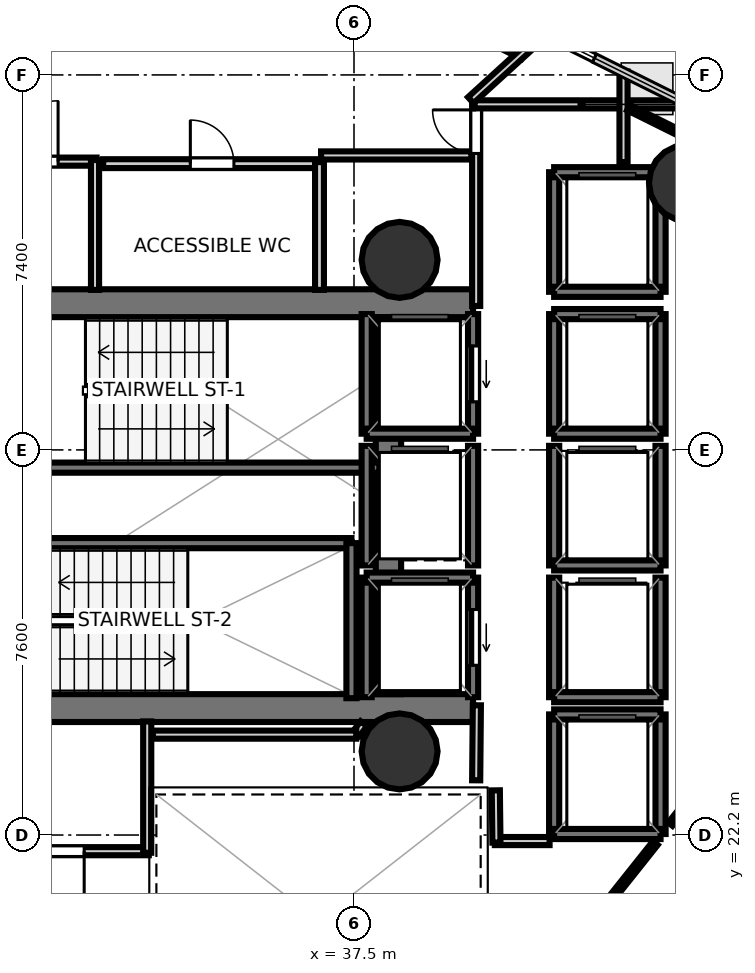
"""IFC4 building model, lengths in metres.
Left out: names, types, materials, properties, quantities, classifications, styles, units other than length and angle.
Written with IfcOpenShell. Run it as: python <this file> out.ifc"""

import sys

from ifc_helpers import new_model, si_unit, direction, frame, frame_2d, origin, origin_2d, place, context, subcontext, project, spatial, rectangle, hollow_circle, extrude, element, fill, save


model = new_model("IFC4")
c1 = context("Model", 3, precision=1e-05, world=origin(), true_north=direction((0.0, 1.0)))
c2 = subcontext(c1, "Body", "Model", "MODEL_VIEW")
j1 = project(units=[si_unit("LENGTHUNIT", "METRE"), si_unit("PLANEANGLEUNIT", "RADIAN")], contexts=[c1])
p1 = place(None, origin())
s1 = spatial("IfcSite", under=j1, at=p1, CompositionType="ELEMENT")
p2 = place(p1, origin())
s2 = spatial("IfcBuilding", under=s1, at=p2, CompositionType="ELEMENT")
p3 = place(p2, frame((0.0, 0.0, 134.8)))
s3 = spatial("IfcBuildingStorey", under=s2, at=p3, CompositionType="ELEMENT", Elevation=134.8)
p4 = place(p3, frame((29.23, 32.695, 0.0), z_axis=(0.0, 0.0, 1.0), x_axis=(1.0, 0.0, 0.0)))
e1 = element("IfcWall", 1, at=p4, inside=s3, PredefinedType="SHEAR", context=c2, shape_type="SweptSolid", body=[
    extrude(rectangle(XDim=10.62, YDim=0.55, at=frame_2d((5.31, 0.0))), origin(), (0.0, 0.0, 1.0), 3.4),
])
p5 = place(p4, frame((0.995, 0.0, 0.0)))
e2 = element("IfcOpeningElement", 2, at=p5, cuts=e1, PredefinedType="OPENING", context=c2, shape_type="SweptSolid", body=[
    extrude(rectangle(XDim=1.25, YDim=2.15, at=frame_2d((0.625, 1.075))), frame((0.0, 0.285, 0.0), z_axis=(0.0, -1.0, 0.0), x_axis=(1.0, 0.0, 0.0)), (0.0, 0.0, 1.0), 0.57),
])
p6 = place(p3, frame((29.23, 24.705, 0.0), z_axis=(0.0, 0.0, 1.0), x_axis=(1.0, 0.0, 0.0)))
e3 = element("IfcWall", 3, at=p6, inside=s3, PredefinedType="SHEAR", context=c2, shape_type="SweptSolid", body=[
    extrude(rectangle(XDim=10.62, YDim=0.55, at=frame_2d((5.31, 0.0))), origin(), (0.0, 0.0, 1.0), 3.4),
])
p7 = place(p6, frame((0.795, 0.0, 0.0)))
e4 = element("IfcOpeningElement", 4, at=p7, cuts=e3, PredefinedType="OPENING", context=c2, shape_type="SweptSolid", body=[
    extrude(rectangle(XDim=1.25, YDim=2.15, at=frame_2d((0.625, 1.075))), frame((0.0, 0.285, 0.0), z_axis=(0.0, -1.0, 0.0), x_axis=(1.0, 0.0, 0.0)), (0.0, 0.0, 1.0), 0.57),
])
p8 = place(p3, frame((38.18, 24.98, 0.0), z_axis=(0.0, 0.0, 1.0), x_axis=(0.0, 1.0, 0.0)))
e5 = element("IfcWall", 5, at=p8, inside=s3, PredefinedType="SHEAR", context=c2, shape_type="SweptSolid", body=[
    extrude(rectangle(XDim=7.44, YDim=0.5, at=frame_2d((3.72, 0.0))), origin(), (0.0, 0.0, 1.0), 3.4),
])
for number, where, z_axis, x_axis in (
    (6, (38.4, 33.55, 0.0), (0.0, 0.0, 1.0), (1.0, 0.0, 0.0)),
    (7, (38.4, 23.85, 0.0), (0.0, 0.0, 1.0), (1.0, 0.0, 0.0)),
    (8, (44.071, 35.07, 0.0), (0.0, 0.0, 1.0), (1.0, 0.0, 0.0)),
):
    element("IfcColumn", number, at=place(p3, frame(where, z_axis=z_axis, x_axis=x_axis)), inside=s3, PredefinedType="COLUMN", context=c2, shape_type="SweptSolid", body=[
        extrude(hollow_circle(Radius=0.75, WallThickness=0.036, at=origin_2d()), origin(), (0.0, 0.0, 1.0), 3.7),
    ])
p9 = place(p3, frame((29.7, 29.45, 0.0), z_axis=(0.0, 0.0, 1.0), x_axis=(1.0, 0.0, 0.0)))
e9 = element("IfcWall", 9, at=p9, inside=s3, PredefinedType="SOLIDWALL", context=c2, shape_type="SweptSolid", body=[
    extrude(rectangle(XDim=8.3, YDim=0.2, at=frame_2d((4.15, 0.0))), origin(), (0.0, 0.0, 1.0), 3.4),
])
p10 = place(p3, frame((29.7, 27.96, 0.0), z_axis=(0.0, 0.0, 1.0), x_axis=(1.0, 0.0, 0.0)))
e10 = element("IfcWall", 10, at=p10, inside=s3, PredefinedType="SOLIDWALL", context=c2, shape_type="SweptSolid", body=[
    extrude(rectangle(XDim=7.75, YDim=0.2, at=frame_2d((3.875, 0.0))), origin(), (0.0, 0.0, 1.0), 3.4),
])
p11 = place(p3, frame((37.45, 24.9, 0.0), z_axis=(0.0, 0.0, 1.0), x_axis=(0.0, 1.0, 0.0)))
e11 = element("IfcWall", 11, at=p11, inside=s3, PredefinedType="SOLIDWALL", context=c2, shape_type="SweptSolid", body=[
    extrude(rectangle(XDim=3.06, YDim=0.2, at=frame_2d((1.53, 0.0))), origin(), (0.0, 0.0, 1.0), 3.4),
])
p12 = place(p3, frame((39.85, 30.12, 0.0), z_axis=(0.0, 0.0, 1.0), x_axis=(0.0, 1.0, 0.0)))
e12 = element("IfcWall", 12, at=p12, inside=s3, PredefinedType="SOLIDWALL", context=c2, shape_type="SweptSolid", body=[
    extrude(rectangle(XDim=2.36, YDim=0.2, at=frame_2d((1.18, 0.0))), origin(), (0.0, 0.0, 1.0), 3.4),
])
p13 = place(p12, frame((0.63, 0.0, 0.0)))
e13 = element("IfcOpeningElement", 13, at=p13, cuts=e12, PredefinedType="OPENING", context=c2, shape_type="SweptSolid", body=[
    extrude(rectangle(XDim=1.1, YDim=2.15, at=frame_2d((0.55, 1.075))), frame((0.0, 0.11, 0.0), z_axis=(0.0, -1.0, 0.0), x_axis=(1.0, 0.0, 0.0)), (0.0, 0.0, 1.0), 0.22),
])
p14 = place(p3, frame((37.75, 30.12, 0.0), z_axis=(0.0, 0.0, 1.0), x_axis=(0.0, 1.0, 0.0)))
e14 = element("IfcWall", 14, at=p14, inside=s3, PredefinedType="SOLIDWALL", context=c2, shape_type="SweptSolid", body=[
    extrude(rectangle(XDim=2.36, YDim=0.2, at=frame_2d((1.18, 0.0))), origin(), (0.0, 0.0, 1.0), 3.4),
])
p15 = place(p3, frame((37.75, 30.12, 0.0), z_axis=(0.0, 0.0, 1.0), x_axis=(1.0, 0.0, 0.0)))
e15 = element("IfcWall", 15, at=p15, inside=s3, PredefinedType="SOLIDWALL", context=c2, shape_type="SweptSolid", body=[
    extrude(rectangle(XDim=2.1, YDim=0.2, at=frame_2d((1.05, 0.0))), origin(), (0.0, 0.0, 1.0), 3.4),
])
p16 = place(p3, frame((39.85, 24.92, 0.0), z_axis=(0.0, 0.0, 1.0), x_axis=(0.0, 1.0, 0.0)))
e16 = element("IfcWall", 16, at=p16, inside=s3, PredefinedType="SOLIDWALL", context=c2, shape_type="SweptSolid", body=[
    extrude(rectangle(XDim=2.36, YDim=0.2, at=frame_2d((1.18, 0.0))), origin(), (0.0, 0.0, 1.0), 3.4),
])
p17 = place(p16, frame((0.63, 0.0, 0.0)))
e17 = element("IfcOpeningElement", 17, at=p17, cuts=e16, PredefinedType="OPENING", context=c2, shape_type="SweptSolid", body=[
    extrude(rectangle(XDim=1.1, YDim=2.15, at=frame_2d((0.55, 1.075))), frame((0.0, 0.11, 0.0), z_axis=(0.0, -1.0, 0.0), x_axis=(1.0, 0.0, 0.0)), (0.0, 0.0, 1.0), 0.22),
])
p18 = place(p3, frame((37.75, 24.92, 0.0), z_axis=(0.0, 0.0, 1.0), x_axis=(0.0, 1.0, 0.0)))
e18 = element("IfcWall", 18, at=p18, inside=s3, PredefinedType="SOLIDWALL", context=c2, shape_type="SweptSolid", body=[
    extrude(rectangle(XDim=2.36, YDim=0.2, at=frame_2d((1.18, 0.0))), origin(), (0.0, 0.0, 1.0), 3.4),
])
p19 = place(p3, frame((37.75, 27.28, 0.0), z_axis=(0.0, 0.0, 1.0), x_axis=(1.0, 0.0, 0.0)))
e19 = element("IfcWall", 19, at=p19, inside=s3, PredefinedType="SOLIDWALL", context=c2, shape_type="SweptSolid", body=[
    extrude(rectangle(XDim=2.1, YDim=0.2, at=frame_2d((1.05, 0.0))), origin(), (0.0, 0.0, 1.0), 3.4),
])
for number, where, z_axis, x_axis in (
    (20, (43.55, 30.12, 0.0), (0.0, 0.0, 1.0), (0.0, 1.0, 0.0)),
    (21, (41.45, 30.12, 0.0), (0.0, 0.0, 1.0), (0.0, 1.0, 0.0)),
):
    element("IfcWall", number, at=place(p3, frame(where, z_axis=z_axis, x_axis=x_axis)), inside=s3, PredefinedType="SOLIDWALL", context=c2, shape_type="SweptSolid", body=[
        extrude(rectangle(XDim=2.36, YDim=0.2, at=frame_2d((1.18, 0.0))), origin(), (0.0, 0.0, 1.0), 3.4),
    ])
for number, where, z_axis, x_axis in (
    (22, (41.45, 32.48, 0.0), (0.0, 0.0, 1.0), (1.0, 0.0, 0.0)),
    (23, (41.45, 30.12, 0.0), (0.0, 0.0, 1.0), (1.0, 0.0, 0.0)),
):
    element("IfcWall", number, at=place(p3, frame(where, z_axis=z_axis, x_axis=x_axis)), inside=s3, PredefinedType="SOLIDWALL", context=c2, shape_type="SweptSolid", body=[
        extrude(rectangle(XDim=2.1, YDim=0.2, at=frame_2d((1.05, 0.0))), origin(), (0.0, 0.0, 1.0), 3.4),
    ])
for number, where, z_axis, x_axis in (
    (24, (43.55, 27.52, 0.0), (0.0, 0.0, 1.0), (0.0, 1.0, 0.0)),
    (25, (41.45, 27.52, 0.0), (0.0, 0.0, 1.0), (0.0, 1.0, 0.0)),
):
    element("IfcWall", number, at=place(p3, frame(where, z_axis=z_axis, x_axis=x_axis)), inside=s3, PredefinedType="SOLIDWALL", context=c2, shape_type="SweptSolid", body=[
        extrude(rectangle(XDim=2.36, YDim=0.2, at=frame_2d((1.18, 0.0))), origin(), (0.0, 0.0, 1.0), 3.4),
    ])
p20 = place(p3, frame((41.45, 27.52, 0.0), z_axis=(0.0, 0.0, 1.0), x_axis=(1.0, 0.0, 0.0)))
e26 = element("IfcWall", 26, at=p20, inside=s3, PredefinedType="SOLIDWALL", context=c2, shape_type="SweptSolid", body=[
    extrude(rectangle(XDim=2.1, YDim=0.2, at=frame_2d((1.05, 0.0))), origin(), (0.0, 0.0, 1.0), 3.4),
])
for number, where, z_axis, x_axis in (
    (27, (43.55, 24.92, 0.0), (0.0, 0.0, 1.0), (0.0, 1.0, 0.0)),
    (28, (41.45, 24.92, 0.0), (0.0, 0.0, 1.0), (0.0, 1.0, 0.0)),
):
    element("IfcWall", number, at=place(p3, frame(where, z_axis=z_axis, x_axis=x_axis)), inside=s3, PredefinedType="SOLIDWALL", context=c2, shape_type="SweptSolid", body=[
        extrude(rectangle(XDim=2.36, YDim=0.2, at=frame_2d((1.18, 0.0))), origin(), (0.0, 0.0, 1.0), 3.4),
    ])
p21 = place(p3, frame((41.45, 24.92, 0.0), z_axis=(0.0, 0.0, 1.0), x_axis=(1.0, 0.0, 0.0)))
e29 = element("IfcWall", 29, at=p21, inside=s3, PredefinedType="SOLIDWALL", context=c2, shape_type="SweptSolid", body=[
    extrude(rectangle(XDim=2.1, YDim=0.2, at=frame_2d((1.05, 0.0))), origin(), (0.0, 0.0, 1.0), 3.4),
])
for number, where, z_axis, x_axis in (
    (30, (39.85, 27.52, 0.0), (0.0, 0.0, 1.0), (0.0, 1.0, 0.0)),
    (31, (37.75, 27.52, 0.0), (0.0, 0.0, 1.0), (0.0, 1.0, 0.0)),
):
    element("IfcWall", number, at=place(p3, frame(where, z_axis=z_axis, x_axis=x_axis)), inside=s3, PredefinedType="SOLIDWALL", context=c2, shape_type="SweptSolid", body=[
        extrude(rectangle(XDim=2.36, YDim=0.2, at=frame_2d((1.18, 0.0))), origin(), (0.0, 0.0, 1.0), 3.4),
    ])
for number, where, z_axis, x_axis in (
    (32, (43.55, 22.22, 0.0), (0.0, 0.0, 1.0), (0.0, 1.0, 0.0)),
    (33, (41.45, 22.22, 0.0), (0.0, 0.0, 1.0), (0.0, 1.0, 0.0)),
):
    element("IfcWall", number, at=place(p3, frame(where, z_axis=z_axis, x_axis=x_axis)), inside=s3, PredefinedType="SOLIDWALL", context=c2, shape_type="SweptSolid", body=[
        extrude(rectangle(XDim=2.36, YDim=0.2, at=frame_2d((1.18, 0.0))), origin(), (0.0, 0.0, 1.0), 3.4),
    ])
for number, where, z_axis, x_axis in (
    (34, (41.45, 24.58, 0.0), (0.0, 0.0, 1.0), (1.0, 0.0, 0.0)),
    (35, (41.45, 22.22, 0.0), (0.0, 0.0, 1.0), (1.0, 0.0, 0.0)),
):
    element("IfcWall", number, at=place(p3, frame(where, z_axis=z_axis, x_axis=x_axis)), inside=s3, PredefinedType="SOLIDWALL", context=c2, shape_type="SweptSolid", body=[
        extrude(rectangle(XDim=2.1, YDim=0.2, at=frame_2d((1.05, 0.0))), origin(), (0.0, 0.0, 1.0), 3.4),
    ])
for number, where, z_axis, x_axis in (
    (36, (43.55, 32.92, 0.0), (0.0, 0.0, 1.0), (0.0, 1.0, 0.0)),
    (37, (41.45, 32.92, 0.0), (0.0, 0.0, 1.0), (0.0, 1.0, 0.0)),
):
    element("IfcWall", number, at=place(p3, frame(where, z_axis=z_axis, x_axis=x_axis)), inside=s3, PredefinedType="SOLIDWALL", context=c2, shape_type="SweptSolid", body=[
        extrude(rectangle(XDim=2.36, YDim=0.2, at=frame_2d((1.18, 0.0))), origin(), (0.0, 0.0, 1.0), 3.4),
    ])
for number, where, z_axis, x_axis in (
    (38, (41.45, 35.28, 0.0), (0.0, 0.0, 1.0), (1.0, 0.0, 0.0)),
    (39, (41.45, 32.92, 0.0), (0.0, 0.0, 1.0), (1.0, 0.0, 0.0)),
):
    element("IfcWall", number, at=place(p3, frame(where, z_axis=z_axis, x_axis=x_axis)), inside=s3, PredefinedType="SOLIDWALL", context=c2, shape_type="SweptSolid", body=[
        extrude(rectangle(XDim=2.1, YDim=0.2, at=frame_2d((1.05, 0.0))), origin(), (0.0, 0.0, 1.0), 3.4),
    ])
p22 = place(p3, frame((29.7, 35.489, 0.0), z_axis=(0.0, 0.0, 1.0), x_axis=(1.0, 0.0, 0.0)))
e40 = element("IfcWall", 40, at=p22, inside=s3, PredefinedType="PARTITIONING", context=c2, shape_type="SweptSolid", body=[
    extrude(rectangle(XDim=2.72, YDim=0.16, at=frame_2d((1.36, 0.0))), origin(), (0.0, 0.0, 1.0), 2.72),
])
p23 = place(p22, frame((0.76, 0.0, 0.0)))
e41 = element("IfcOpeningElement", 41, at=p23, cuts=e40, PredefinedType="OPENING", context=c2, shape_type="SweptSolid", body=[
    extrude(rectangle(XDim=1.2, YDim=2.15, at=frame_2d((0.6, 1.075))), frame((0.0, 0.09, 0.0), z_axis=(0.0, -1.0, 0.0), x_axis=(1.0, 0.0, 0.0)), (0.0, 0.0, 1.0), 0.18),
])
p24 = place(p3, frame((32.389, 35.52, 0.0), z_axis=(0.0, 0.0, 1.0), x_axis=(0.0, -1.0, 0.0)))
e42 = element("IfcWall", 42, at=p24, inside=s3, PredefinedType="PARTITIONING", context=c2, shape_type="SweptSolid", body=[
    extrude(rectangle(XDim=2.562, YDim=0.16, at=frame_2d((1.281, 0.0))), origin(), (0.0, 0.0, 1.0), 2.72),
])
p25 = place(p3, frame((33.45, 21.881, 0.0), z_axis=(0.0, 0.0, 1.0), x_axis=(-1.0, 0.0, 0.0)))
e43 = element("IfcWall", 43, at=p25, inside=s3, PredefinedType="PARTITIONING", context=c2, shape_type="SweptSolid", body=[
    extrude(rectangle(XDim=3.75, YDim=0.16, at=frame_2d((1.875, 0.0))), origin(), (0.0, 0.0, 1.0), 2.72),
])
p26 = place(p25, frame((1.275, 0.0, 0.0)))
e44 = element("IfcOpeningElement", 44, at=p26, cuts=e43, PredefinedType="OPENING", context=c2, shape_type="SweptSolid", body=[
    extrude(rectangle(XDim=1.2, YDim=2.15, at=frame_2d((0.6, 1.075))), frame((0.0, 0.09, 0.0), z_axis=(0.0, -1.0, 0.0), x_axis=(1.0, 0.0, 0.0)), (0.0, 0.0, 1.0), 0.18),
])
p27 = place(p25, frame((2.66, 0.0, 0.0)))
e45 = element("IfcOpeningElement", 45, at=p27, cuts=e43, PredefinedType="OPENING", context=c2, shape_type="SweptSolid", body=[
    extrude(rectangle(XDim=0.86, YDim=2.05, at=frame_2d((0.43, 1.025))), frame((0.0, 0.09, 0.0), z_axis=(0.0, -1.0, 0.0), x_axis=(1.0, 0.0, 0.0)), (0.0, 0.0, 1.0), 0.18),
])
p28 = place(p3, frame((33.419, 24.442, 0.0), z_axis=(0.0, 0.0, 1.0), x_axis=(0.0, -1.0, 0.0)))
e46 = element("IfcWall", 46, at=p28, inside=s3, PredefinedType="PARTITIONING", context=c2, shape_type="SweptSolid", body=[
    extrude(rectangle(XDim=2.592, YDim=0.16, at=frame_2d((1.296, 0.0))), origin(), (0.0, 0.0, 1.0), 2.72),
])
p29 = place(p3, frame((39.911, 32.64, 0.0), z_axis=(0.0, 0.0, 1.0), x_axis=(0.0, 1.0, 0.0)))
e47 = element("IfcWall", 47, at=p29, inside=s3, PredefinedType="PARTITIONING", context=c2, shape_type="SweptSolid", body=[
    extrude(rectangle(XDim=4.01, YDim=0.16, at=frame_2d((2.005, 0.0))), origin(), (0.0, 0.0, 1.0), 2.72),
])
p30 = place(p29, frame((3.01, 0.0, 0.0)))
e48 = element("IfcOpeningElement", 48, at=p30, cuts=e47, PredefinedType="OPENING", context=c2, shape_type="SweptSolid", body=[
    extrude(rectangle(XDim=0.86, YDim=2.05, at=frame_2d((0.43, 1.025))), frame((0.0, 0.09, 0.0), z_axis=(0.0, -1.0, 0.0), x_axis=(1.0, 0.0, 0.0)), (0.0, 0.0, 1.0), 0.18),
])
p31 = place(p3, frame((39.88, 36.619, 0.0), z_axis=(0.0, 0.0, 1.0), x_axis=(1.0, 0.0, 0.0)))
e49 = element("IfcWall", 49, at=p31, inside=s3, PredefinedType="PARTITIONING", context=c2, shape_type="SweptSolid", body=[
    extrude(rectangle(XDim=4.223, YDim=0.16, at=frame_2d((2.111, 0.0))), origin(), (0.0, 0.0, 1.0), 2.72),
])
p32 = place(p3, frame((42.819, 37.267, 0.0), z_axis=(0.0, 0.0, 1.0), x_axis=(0.0, -1.0, 0.0)))
e50 = element("IfcWall", 50, at=p32, inside=s3, PredefinedType="PARTITIONING", context=c2, shape_type="SweptSolid", body=[
    extrude(rectangle(XDim=1.787, YDim=0.16, at=frame_2d((0.894, 0.0))), origin(), (0.0, 0.0, 1.0), 2.72),
])
p33 = place(p3, frame((41.36, 22.081, 0.0), z_axis=(0.0, 0.0, 1.0), x_axis=(-1.0, 0.0, 0.0)))
e51 = element("IfcWall", 51, at=p33, inside=s3, PredefinedType="PARTITIONING", context=c2, shape_type="SweptSolid", body=[
    extrude(rectangle(XDim=1.08, YDim=0.16, at=frame_2d((0.54, 0.0))), origin(), (0.0, 0.0, 1.0), 2.72),
])
p34 = place(p3, frame((40.311, 22.05, 0.0), z_axis=(0.0, 0.0, 1.0), x_axis=(-0.011836292006, 0.999929948642, 0.0)))
e52 = element("IfcWall", 52, at=p34, inside=s3, PredefinedType="PARTITIONING", context=c2, shape_type="SweptSolid", body=[
    extrude(rectangle(XDim=1.031, YDim=0.16, at=frame_2d((0.516, 0.0))), origin(), (0.0, 0.0, 1.0), 2.72),
])
p35 = place(p3, frame((39.911, 23.28, 0.0), z_axis=(0.0, 0.0, 1.0), x_axis=(0.009397771291, 0.999955839972, 0.0)))
e53 = element("IfcWall", 53, at=p35, inside=s3, PredefinedType="PARTITIONING", context=c2, shape_type="SweptSolid", body=[
    extrude(rectangle(XDim=1.481, YDim=0.16, at=frame_2d((0.74, 0.0))), origin(), (0.0, 0.0, 1.0), 2.72),
])
p36 = place(p3, frame((32.55, 35.449, 0.0), z_axis=(0.0, 0.0, 1.0), x_axis=(1.0, 0.0, 0.0)))
e54 = element("IfcWall", 54, at=p36, inside=s3, PredefinedType="PLUMBINGWALL", context=c2, shape_type="SweptSolid", body=[
    extrude(rectangle(XDim=4.3, YDim=0.175, at=frame_2d((2.15, 0.0))), origin(), (0.0, 0.0, 1.0), 2.72),
])
p37 = place(p36, frame((1.72, 0.0, 0.0)))
e55 = element("IfcOpeningElement", 55, at=p37, cuts=e54, PredefinedType="OPENING", context=c2, shape_type="SweptSolid", body=[
    extrude(rectangle(XDim=0.86, YDim=2.05, at=frame_2d((0.43, 1.025))), frame((0.0, 0.097, 0.0), z_axis=(0.0, -1.0, 0.0), x_axis=(1.0, 0.0, 0.0)), (0.0, 0.0, 1.0), 0.195),
])
p38 = place(p3, frame((36.819, 35.48, 0.0), z_axis=(0.0, 0.0, 1.0), x_axis=(0.0, -1.0, 0.0)))
e56 = element("IfcWall", 56, at=p38, inside=s3, PredefinedType="PLUMBINGWALL", context=c2, shape_type="SweptSolid", body=[
    extrude(rectangle(XDim=2.522, YDim=0.175, at=frame_2d((1.261, 0.0))), origin(), (0.0, 0.0, 1.0), 2.72),
])
p39 = place(p3, frame((37.694, 24.396, 0.0), z_axis=(0.0, 0.0, 1.0), x_axis=(-0.607118658061, -0.794611184815, 0.0)))
e57 = element("IfcWall", 57, at=p39, inside=s3, PredefinedType="PARTITIONING", context=c2, shape_type="SweptSolid", body=[
    extrude(rectangle(XDim=0.246, YDim=0.16, at=frame_2d((0.123, 0.0))), origin(), (0.0, 0.0, 1.0), 2.72),
])
p40 = place(p3, frame((37.545, 24.181, 0.0), z_axis=(0.0, 0.0, 1.0), x_axis=(-1.0, 0.0, 0.0)))
e58 = element("IfcWall", 58, at=p40, inside=s3, PredefinedType="PARTITIONING", context=c2, shape_type="SweptSolid", body=[
    extrude(rectangle(XDim=4.015, YDim=0.16, at=frame_2d((2.007, 0.0))), origin(), (0.0, 0.0, 1.0), 2.72),
])
p41 = place(p3, frame((39.161, 38.422, 0.0), z_axis=(0.0, 0.0, 1.0), x_axis=(0.895492718696, -0.445076162878, 0.0)))
e59 = element("IfcWall", 59, at=p41, inside=s3, PredefinedType="PARTITIONING", context=c2, shape_type="SweptSolid", body=[
    extrude(rectangle(XDim=1.874, YDim=0.16, at=frame_2d((0.937, 0.0))), origin(), (0.0, 0.0, 1.0), 2.72),
])
p42 = place(p3, frame((41.271, 38.038, 0.0), z_axis=(0.0, 0.0, 1.0), x_axis=(-0.739271241346, -0.673407775214, 0.0)))
e60 = element("IfcWall", 60, at=p42, inside=s3, PredefinedType="PARTITIONING", context=c2, shape_type="SweptSolid", body=[
    extrude(rectangle(XDim=1.983, YDim=0.16, at=frame_2d((0.992, 0.0))), origin(), (0.0, 0.0, 1.0), 2.72),
])
p43 = place(p3, frame((39.818, 35.611, 0.0), z_axis=(0.0, 0.0, 1.0), x_axis=(-1.0, 0.0, 0.0)))
e61 = element("IfcWall", 61, at=p43, inside=s3, PredefinedType="PARTITIONING", context=c2, shape_type="SweptSolid", body=[
    extrude(rectangle(XDim=2.968, YDim=0.16, at=frame_2d((1.484, 0.0))), origin(), (0.0, 0.0, 1.0), 2.72),
])
p44 = place(p3, frame((40.304, 18.092, 0.0), z_axis=(0.0, 0.0, 1.0), x_axis=(0.622687180488, 0.782470878216, 0.0)))
e62 = element("IfcWall", 62, at=p44, inside=s3, PredefinedType="PARTITIONING", context=c2, shape_type="SweptSolid", body=[
    extrude(rectangle(XDim=5.047, YDim=0.12, at=frame_2d((2.523, 0.0))), origin(), (0.0, 0.0, 1.0), 2.72),
])
p45 = place(p3, frame((43.744, 22.414, 0.0), z_axis=(0.0, 0.0, 1.0), x_axis=(0.622689577397, 0.782468970759, 0.0)))
e63 = element("IfcWall", 63, at=p45, inside=s3, PredefinedType="PARTITIONING", context=c2, shape_type="SweptSolid", body=[
    extrude(rectangle(XDim=13.182, YDim=0.105, at=frame_2d((6.591, 0.0))), origin(), (0.0, 0.0, 1.0), 2.72),
])
p46 = place(p45, frame((5.966, 0.0, 0.0)))
e64 = element("IfcOpeningElement", 64, at=p46, cuts=e63, PredefinedType="OPENING", context=c2, shape_type="SweptSolid", body=[
    extrude(rectangle(XDim=1.25, YDim=2.2, at=frame_2d((0.625, 1.1))), frame((0.0, 0.062, 0.0), z_axis=(0.0, -1.0, 0.0), x_axis=(1.0, 0.0, 0.0)), (0.0, 0.0, 1.0), 0.125),
])
p47 = place(p3, frame((42.916, 36.556, 0.0), z_axis=(0.0, 0.0, 1.0), x_axis=(0.895450730662, -0.445160632758, 0.0)))
e65 = element("IfcWall", 65, at=p47, inside=s3, PredefinedType="PARTITIONING", context=c2, shape_type="SweptSolid", body=[
    extrude(rectangle(XDim=9.519, YDim=0.12, at=frame_2d((4.76, 0.0))), origin(), (0.0, 0.0, 1.0), 2.72),
])
p48 = place(p13, origin())
e66 = element("IfcDoor", 66, at=p48, inside=s3, OperationType="SLIDING_TO_LEFT", PredefinedType="DOOR", context=c2, shape_type="SweptSolid", body=[
    extrude(rectangle(XDim=1.1, YDim=2.15, at=frame_2d((0.55, 1.075))), frame((0.0, 0.025, 0.0), z_axis=(0.0, -1.0, 0.0), x_axis=(1.0, 0.0, 0.0)), (0.0, 0.0, 1.0), 0.05),
])
fill(e13, e66)
p49 = place(p17, origin())
e67 = element("IfcDoor", 67, at=p49, inside=s3, OperationType="SLIDING_TO_LEFT", PredefinedType="DOOR", context=c2, shape_type="SweptSolid", body=[
    extrude(rectangle(XDim=1.1, YDim=2.15, at=frame_2d((0.55, 1.075))), frame((0.0, 0.025, 0.0), z_axis=(0.0, -1.0, 0.0), x_axis=(1.0, 0.0, 0.0)), (0.0, 0.0, 1.0), 0.05),
])
fill(e17, e67)
p50 = place(p23, origin())
e68 = element("IfcDoor", 68, at=p50, inside=s3, OperationType="SINGLE_SWING_RIGHT", PredefinedType="DOOR", context=c2, shape_type="SweptSolid", body=[
    extrude(rectangle(XDim=1.2, YDim=2.15, at=frame_2d((0.6, 1.075))), frame((0.0, 0.025, 0.0), z_axis=(0.0, -1.0, 0.0), x_axis=(1.0, 0.0, 0.0)), (0.0, 0.0, 1.0), 0.05),
])
fill(e41, e68)
p51 = place(p26, origin())
e69 = element("IfcDoor", 69, at=p51, inside=s3, OperationType="SINGLE_SWING_LEFT", PredefinedType="DOOR", context=c2, shape_type="SweptSolid", body=[
    extrude(rectangle(XDim=1.2, YDim=2.15, at=frame_2d((0.6, 1.075))), frame((0.0, 0.025, 0.0), z_axis=(0.0, -1.0, 0.0), x_axis=(1.0, 0.0, 0.0)), (0.0, 0.0, 1.0), 0.05),
])
fill(e44, e69)
p52 = place(p30, origin())
e70 = element("IfcDoor", 70, at=p52, inside=s3, OperationType="SINGLE_SWING_RIGHT", PredefinedType="DOOR", context=c2, shape_type="SweptSolid", body=[
    extrude(rectangle(XDim=0.86, YDim=2.05, at=frame_2d((0.43, 1.025))), frame((0.0, 0.025, 0.0), z_axis=(0.0, -1.0, 0.0), x_axis=(1.0, 0.0, 0.0)), (0.0, 0.0, 1.0), 0.05),
])
fill(e48, e70)
p53 = place(p37, origin())
e71 = element("IfcDoor", 71, at=p53, inside=s3, OperationType="SINGLE_SWING_LEFT", PredefinedType="DOOR", context=c2, shape_type="SweptSolid", body=[
    extrude(rectangle(XDim=0.86, YDim=2.05, at=frame_2d((0.43, 1.025))), frame((0.0, 0.025, 0.0), z_axis=(0.0, -1.0, 0.0), x_axis=(1.0, 0.0, 0.0)), (0.0, 0.0, 1.0), 0.05),
])
fill(e55, e71)
save(model, sys.argv[1])
